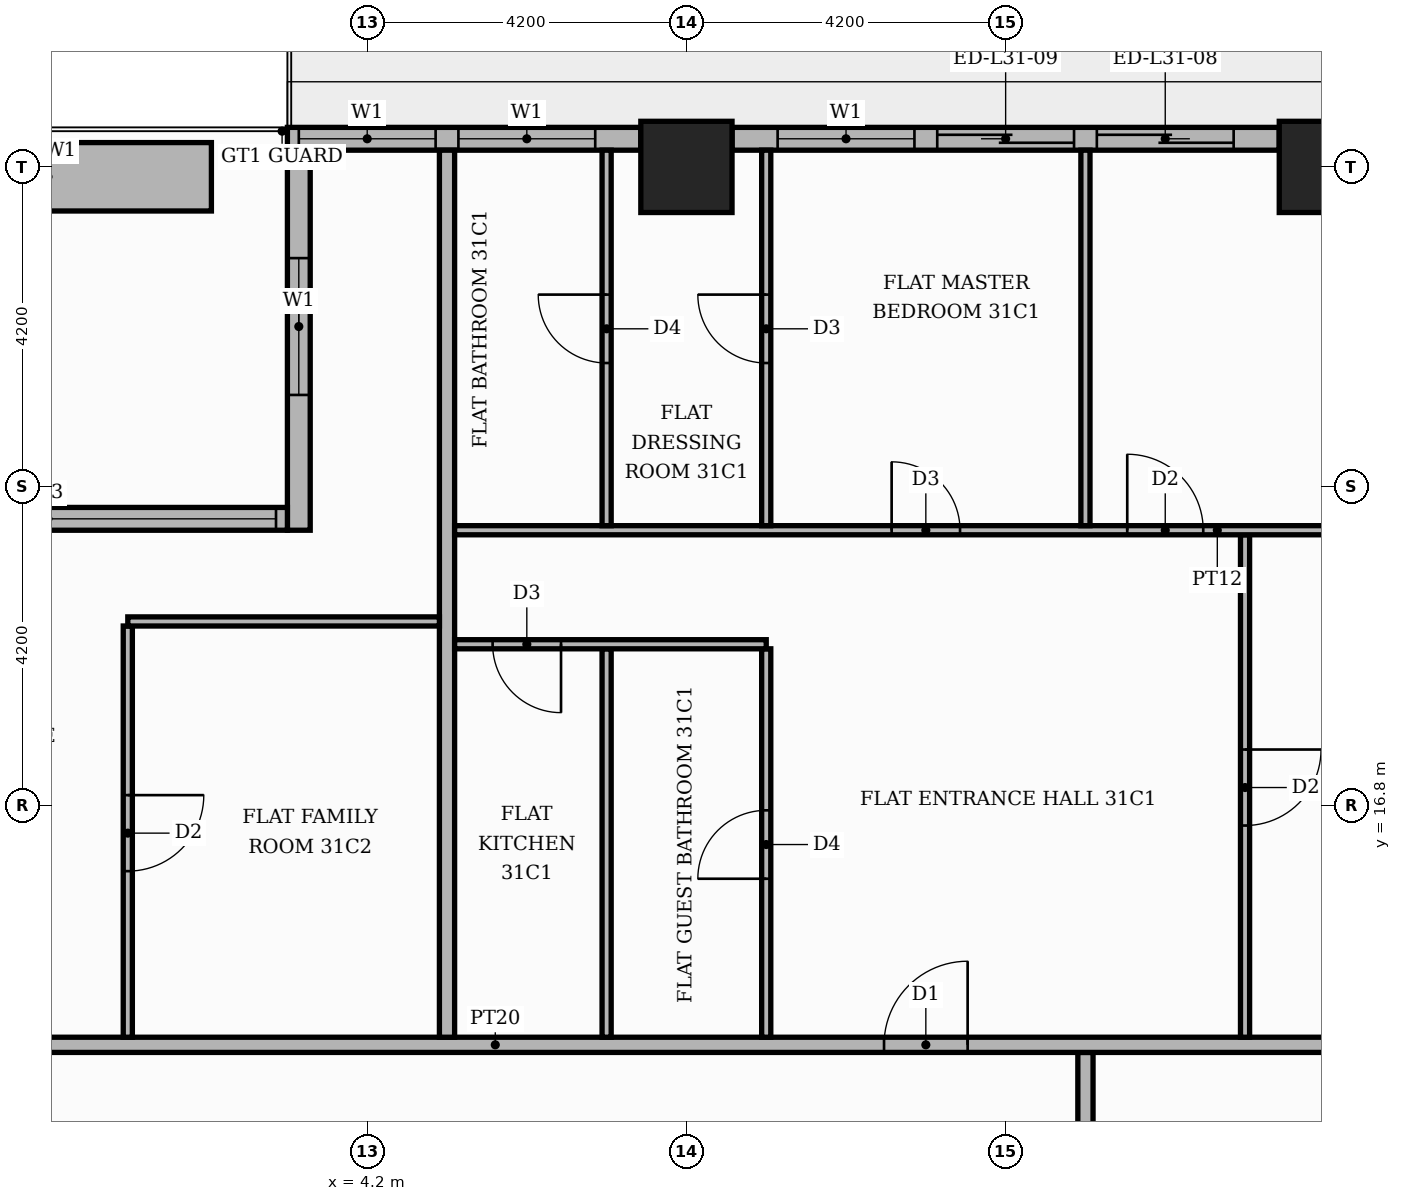
"""IFC4 building model, lengths in metres.
Left out: names, types, materials, properties, quantities, classifications, styles, units other than length and angle.
Written with IfcOpenShell. Run it as: python <this file> out.ifc"""

import sys

from ifc_helpers import new_model, si_unit, direction, frame, frame_2d, origin, origin_2d, place, context, subcontext, project, spatial, rectangle, extrude, element, fill, save


model = new_model("IFC4")
c1 = context("Model", 3, precision=1e-05, world=origin(), true_north=direction((0.0, 1.0)))
c2 = subcontext(c1, "Body", "Model", "MODEL_VIEW")
j1 = project(units=[si_unit("LENGTHUNIT", "METRE"), si_unit("PLANEANGLEUNIT", "RADIAN")], contexts=[c1])
p1 = place(None, origin())
s1 = spatial("IfcSite", under=j1, at=p1, CompositionType="ELEMENT")
p2 = place(p1, origin())
s2 = spatial("IfcBuilding", under=s1, at=p2, CompositionType="ELEMENT")
p3 = place(p2, frame((0.0, 0.0, 133.8)))
s3 = spatial("IfcBuildingStorey", under=s2, at=p3, CompositionType="ELEMENT", Elevation=133.8)
for number, where, z_axis, x_axis in (
    (1, (8.4, 25.2, 0.0), (0.0, 0.0, 1.0), (1.0, 0.0, 0.0)),
    (2, (16.8, 25.2, 0.0), (0.0, 0.0, 1.0), (1.0, 0.0, 0.0)),
):
    element("IfcColumn", number, at=place(p3, frame(where, z_axis=z_axis, x_axis=x_axis)), inside=s3, PredefinedType="COLUMN", context=c2, shape_type="SweptSolid", body=[
        extrude(rectangle(XDim=1.2, YDim=1.2, at=origin_2d()), origin(), (0.0, 0.0, 1.0), 3.9),
    ])
p4 = place(p3, frame((16.2, 25.57, 0.0), z_axis=(0.0, 0.0, 1.0), x_axis=(-1.0, 0.0, 0.0)))
e3 = element("IfcWall", 3, at=p4, inside=s3, PredefinedType="STANDARD", context=c2, shape_type="SweptSolid", body=[
    extrude(rectangle(XDim=7.2, YDim=0.3, at=frame_2d((3.6, 0.0))), origin(), (0.0, 0.0, 1.0), 3.48),
])
p5 = place(p4, frame((0.6, 0.0, 0.0)))
e4 = element("IfcOpeningElement", 4, at=p5, cuts=e3, PredefinedType="OPENING", context=c2, shape_type="SweptSolid", body=[
    extrude(rectangle(XDim=1.8, YDim=2.4, at=frame_2d((0.9, 1.2))), frame((0.0, 0.16, 0.0), z_axis=(0.0, -1.0, 0.0), x_axis=(1.0, 0.0, 0.0)), (0.0, 0.0, 1.0), 0.32),
])
p6 = place(p4, frame((2.7, 0.0, 0.0)))
e5 = element("IfcOpeningElement", 5, at=p6, cuts=e3, PredefinedType="OPENING", context=c2, shape_type="SweptSolid", body=[
    extrude(rectangle(XDim=1.8, YDim=2.4, at=frame_2d((0.9, 1.2))), frame((0.0, 0.16, 0.0), z_axis=(0.0, -1.0, 0.0), x_axis=(1.0, 0.0, 0.0)), (0.0, 0.0, 1.0), 0.32),
])
p7 = place(p4, frame((4.8, 0.0, 0.9)))
e6 = element("IfcOpeningElement", 6, at=p7, cuts=e3, PredefinedType="OPENING", context=c2, shape_type="SweptSolid", body=[
    extrude(rectangle(XDim=1.8, YDim=2.1, at=frame_2d((0.9, 1.05))), frame((0.0, 0.16, 0.0), z_axis=(0.0, -1.0, 0.0), x_axis=(1.0, 0.0, 0.0)), (0.0, 0.0, 1.0), 0.32),
])
p8 = place(p3, frame((7.8, 25.57, 0.0), z_axis=(0.0, 0.0, 1.0), x_axis=(-1.0, 0.0, 0.0)))
e7 = element("IfcWall", 7, at=p8, inside=s3, PredefinedType="STANDARD", context=c2, shape_type="SweptSolid", body=[
    extrude(rectangle(XDim=4.65, YDim=0.3, at=frame_2d((2.325, 0.0))), origin(), (0.0, 0.0, 1.0), 3.48),
])
p9 = place(p8, frame((0.6, 0.0, 0.9)))
e8 = element("IfcOpeningElement", 8, at=p9, cuts=e7, PredefinedType="OPENING", context=c2, shape_type="SweptSolid", body=[
    extrude(rectangle(XDim=1.8, YDim=2.1, at=frame_2d((0.9, 1.05))), frame((0.0, 0.16, 0.0), z_axis=(0.0, -1.0, 0.0), x_axis=(1.0, 0.0, 0.0)), (0.0, 0.0, 1.0), 0.32),
])
p10 = place(p8, frame((2.7, 0.0, 0.9)))
e9 = element("IfcOpeningElement", 9, at=p10, cuts=e7, PredefinedType="OPENING", context=c2, shape_type="SweptSolid", body=[
    extrude(rectangle(XDim=1.8, YDim=2.1, at=frame_2d((0.9, 1.05))), frame((0.0, 0.16, 0.0), z_axis=(0.0, -1.0, 0.0), x_axis=(1.0, 0.0, 0.0)), (0.0, 0.0, 1.0), 0.32),
])
p11 = place(p3, frame((3.3, 25.42, 0.0), z_axis=(0.0, 0.0, 1.0), x_axis=(0.0, -1.0, 0.0)))
e10 = element("IfcWall", 10, at=p11, inside=s3, PredefinedType="STANDARD", context=c2, shape_type="SweptSolid", body=[
    extrude(rectangle(XDim=5.0, YDim=0.3, at=frame_2d((2.5, 0.0))), origin(), (0.0, 0.0, 1.0), 3.48),
])
p12 = place(p11, frame((1.42, 0.0, 0.9)))
e11 = element("IfcOpeningElement", 11, at=p12, cuts=e10, PredefinedType="OPENING", context=c2, shape_type="SweptSolid", body=[
    extrude(rectangle(XDim=1.8, YDim=2.1, at=frame_2d((0.9, 1.05))), frame((0.0, 0.16, 0.0), z_axis=(0.0, -1.0, 0.0), x_axis=(1.0, 0.0, 0.0)), (0.0, 0.0, 1.0), 0.32),
])
p13 = place(p3, frame((3.15, 20.57, 0.0), z_axis=(0.0, 0.0, 1.0), x_axis=(-1.0, 0.0, 0.0)))
e12 = element("IfcWall", 12, at=p13, inside=s3, PredefinedType="STANDARD", context=c2, shape_type="SweptSolid", body=[
    extrude(rectangle(XDim=6.6, YDim=0.3, at=frame_2d((3.3, 0.0))), origin(), (0.0, 0.0, 1.0), 3.48),
])
p14 = place(p13, frame((0.15, 0.0, 0.9)))
e13 = element("IfcOpeningElement", 13, at=p14, cuts=e12, PredefinedType="OPENING", context=c2, shape_type="SweptSolid", body=[
    extrude(rectangle(XDim=6.0, YDim=2.1, at=frame_2d((3.0, 1.05))), frame((0.0, 0.16, 0.0), z_axis=(0.0, -1.0, 0.0), x_axis=(1.0, 0.0, 0.0)), (0.0, 0.0, 1.0), 0.32),
])
p15 = place(p3, frame((-2.15, 25.07, 0.0), z_axis=(0.0, 0.0, 1.0), x_axis=(1.0, 0.0, 0.0)))
e14 = element("IfcWall", 14, at=p15, inside=s3, PredefinedType="MOVABLE", context=c2, shape_type="SweptSolid", body=[
    extrude(rectangle(XDim=4.3, YDim=0.9, at=frame_2d((2.15, 0.0))), origin(), (0.0, 0.0, 1.0), 0.6),
])
p16 = place(p3, frame((13.65, 11.1, 0.0), z_axis=(0.0, 0.0, 1.0), x_axis=(0.0, 1.0, 0.0)))
e15 = element("IfcWall", 15, at=p16, inside=s3, PredefinedType="PARTITIONING", context=c2, shape_type="SweptSolid", body=[
    extrude(rectangle(XDim=2.45, YDim=0.2, at=frame_2d((1.225, 0.0))), origin(), (0.0, 0.0, 1.0), 3.48),
])
p17 = place(p3, frame((-13.65, 13.65, 0.0), z_axis=(0.0, 0.0, 1.0), x_axis=(1.0, 0.0, 0.0)))
e16 = element("IfcWall", 16, at=p17, inside=s3, PredefinedType="PARTITIONING", context=c2, shape_type="SweptSolid", body=[
    extrude(rectangle(XDim=39.07, YDim=0.2, at=frame_2d((19.535, 0.0))), origin(), (0.0, 0.0, 1.0), 3.48),
])
p18 = place(p17, frame((24.65, 0.0, 0.0)))
e17 = element("IfcOpeningElement", 17, at=p18, cuts=e16, PredefinedType="OPENING", context=c2, shape_type="SweptSolid", body=[
    extrude(rectangle(XDim=1.1, YDim=2.4, at=frame_2d((0.55, 1.2))), frame((0.0, 0.11, 0.0), z_axis=(0.0, -1.0, 0.0), x_axis=(1.0, 0.0, 0.0)), (0.0, 0.0, 1.0), 0.22),
])
p19 = place(p17, frame((12.05, 0.0, 0.0)))
e18 = element("IfcOpeningElement", 18, at=p19, cuts=e16, PredefinedType="OPENING", context=c2, shape_type="SweptSolid", body=[
    extrude(rectangle(XDim=1.1, YDim=2.4, at=frame_2d((0.55, 1.2))), frame((0.0, 0.11, 0.0), z_axis=(0.0, -1.0, 0.0), x_axis=(1.0, 0.0, 0.0)), (0.0, 0.0, 1.0), 0.22),
])
p20 = place(p3, frame((1.05, 13.75, 0.0), z_axis=(0.0, 0.0, 1.0), x_axis=(0.0, 1.0, 0.0)))
e19 = element("IfcWall", 19, at=p20, inside=s3, PredefinedType="PARTITIONING", context=c2, shape_type="SweptSolid", body=[
    extrude(rectangle(XDim=5.41, YDim=0.12, at=frame_2d((2.705, 0.0))), origin(), (0.0, 0.0, 1.0), 3.48),
])
p21 = place(p20, frame((2.185, 0.0, 0.0)))
e20 = element("IfcOpeningElement", 20, at=p21, cuts=e19, PredefinedType="OPENING", context=c2, shape_type="SweptSolid", body=[
    extrude(rectangle(XDim=1.0, YDim=2.1, at=frame_2d((0.5, 1.05))), frame((0.0, 0.07, 0.0), z_axis=(0.0, -1.0, 0.0), x_axis=(1.0, 0.0, 0.0)), (0.0, 0.0, 1.0), 0.14),
])
p22 = place(p3, frame((5.25, 13.75, 0.0), z_axis=(0.0, 0.0, 1.0), x_axis=(0.0, 1.0, 0.0)))
e21 = element("IfcWall", 21, at=p22, inside=s3, PredefinedType="PARTITIONING", context=c2, shape_type="SweptSolid", body=[
    extrude(rectangle(XDim=11.67, YDim=0.2, at=frame_2d((5.835, 0.0))), origin(), (0.0, 0.0, 1.0), 3.48),
])
p23 = place(p3, frame((7.35, 13.75, 0.0), z_axis=(0.0, 0.0, 1.0), x_axis=(0.0, 1.0, 0.0)))
e22 = element("IfcWall", 22, at=p23, inside=s3, PredefinedType="PARTITIONING", context=c2, shape_type="SweptSolid", body=[
    extrude(rectangle(XDim=5.11, YDim=0.12, at=frame_2d((2.555, 0.0))), origin(), (0.0, 0.0, 1.0), 3.48),
])
p24 = place(p3, frame((9.45, 13.75, 0.0), z_axis=(0.0, 0.0, 1.0), x_axis=(0.0, 1.0, 0.0)))
e23 = element("IfcWall", 23, at=p24, inside=s3, PredefinedType="PARTITIONING", context=c2, shape_type="SweptSolid", body=[
    extrude(rectangle(XDim=5.11, YDim=0.12, at=frame_2d((2.555, 0.0))), origin(), (0.0, 0.0, 1.0), 3.48),
])
p25 = place(p24, frame((2.085, 0.0, 0.0)))
e24 = element("IfcOpeningElement", 24, at=p25, cuts=e23, PredefinedType="OPENING", context=c2, shape_type="SweptSolid", body=[
    extrude(rectangle(XDim=0.9, YDim=2.1, at=frame_2d((0.45, 1.05))), frame((0.0, 0.07, 0.0), z_axis=(0.0, -1.0, 0.0), x_axis=(1.0, 0.0, 0.0)), (0.0, 0.0, 1.0), 0.14),
])
p26 = place(p3, frame((15.75, 13.75, 0.0), z_axis=(0.0, 0.0, 1.0), x_axis=(0.0, 1.0, 0.0)))
e25 = element("IfcWall", 25, at=p26, inside=s3, PredefinedType="PARTITIONING", context=c2, shape_type="SweptSolid", body=[
    extrude(rectangle(XDim=6.61, YDim=0.12, at=frame_2d((3.305, 0.0))), origin(), (0.0, 0.0, 1.0), 3.48),
])
p27 = place(p26, frame((2.785, 0.0, 0.0)))
e26 = element("IfcOpeningElement", 26, at=p27, cuts=e25, PredefinedType="OPENING", context=c2, shape_type="SweptSolid", body=[
    extrude(rectangle(XDim=1.0, YDim=2.1, at=frame_2d((0.5, 1.05))), frame((0.0, 0.07, 0.0), z_axis=(0.0, -1.0, 0.0), x_axis=(1.0, 0.0, 0.0)), (0.0, 0.0, 1.0), 0.14),
])
p28 = place(p3, frame((5.35, 18.92, 0.0), z_axis=(0.0, 0.0, 1.0), x_axis=(1.0, 0.0, 0.0)))
e27 = element("IfcWall", 27, at=p28, inside=s3, PredefinedType="PARTITIONING", context=c2, shape_type="SweptSolid", body=[
    extrude(rectangle(XDim=4.1, YDim=0.12, at=frame_2d((2.05, 0.0))), origin(), (0.0, 0.0, 1.0), 3.48),
])
p29 = place(p28, frame((0.5, 0.0, 0.0)))
e28 = element("IfcOpeningElement", 28, at=p29, cuts=e27, PredefinedType="OPENING", context=c2, shape_type="SweptSolid", body=[
    extrude(rectangle(XDim=0.9, YDim=2.1, at=frame_2d((0.45, 1.05))), frame((0.0, 0.07, 0.0), z_axis=(0.0, -1.0, 0.0), x_axis=(1.0, 0.0, 0.0)), (0.0, 0.0, 1.0), 0.14),
])
p30 = place(p3, frame((1.05, 19.22, 0.0), z_axis=(0.0, 0.0, 1.0), x_axis=(1.0, 0.0, 0.0)))
e29 = element("IfcWall", 29, at=p30, inside=s3, PredefinedType="PARTITIONING", context=c2, shape_type="SweptSolid", body=[
    extrude(rectangle(XDim=4.1, YDim=0.12, at=frame_2d((2.05, 0.0))), origin(), (0.0, 0.0, 1.0), 3.48),
])
p31 = place(p3, frame((5.35, 20.42, 0.0), z_axis=(0.0, 0.0, 1.0), x_axis=(1.0, 0.0, 0.0)))
e30 = element("IfcWall", 30, at=p31, inside=s3, PredefinedType="PARTITIONING", context=c2, shape_type="SweptSolid", body=[
    extrude(rectangle(XDim=20.07, YDim=0.12, at=frame_2d((10.035, 0.0))), origin(), (0.0, 0.0, 1.0), 3.48),
])
p32 = place(p31, frame((8.85, 0.0, 0.0)))
e31 = element("IfcOpeningElement", 31, at=p32, cuts=e30, PredefinedType="OPENING", context=c2, shape_type="SweptSolid", body=[
    extrude(rectangle(XDim=1.0, YDim=2.1, at=frame_2d((0.5, 1.05))), frame((0.0, 0.07, 0.0), z_axis=(0.0, -1.0, 0.0), x_axis=(1.0, 0.0, 0.0)), (0.0, 0.0, 1.0), 0.14),
])
p33 = place(p31, frame((5.75, 0.0, 0.0)))
e32 = element("IfcOpeningElement", 32, at=p33, cuts=e30, PredefinedType="OPENING", context=c2, shape_type="SweptSolid", body=[
    extrude(rectangle(XDim=0.9, YDim=2.1, at=frame_2d((0.45, 1.05))), frame((0.0, 0.07, 0.0), z_axis=(0.0, -1.0, 0.0), x_axis=(1.0, 0.0, 0.0)), (0.0, 0.0, 1.0), 0.14),
])
p34 = place(p3, frame((7.35, 20.48, 0.0), z_axis=(0.0, 0.0, 1.0), x_axis=(0.0, 1.0, 0.0)))
e33 = element("IfcWall", 33, at=p34, inside=s3, PredefinedType="PARTITIONING", context=c2, shape_type="SweptSolid", body=[
    extrude(rectangle(XDim=4.94, YDim=0.12, at=frame_2d((2.47, 0.0))), origin(), (0.0, 0.0, 1.0), 3.48),
])
p35 = place(p34, frame((2.14, 0.0, 0.0)))
e34 = element("IfcOpeningElement", 34, at=p35, cuts=e33, PredefinedType="OPENING", context=c2, shape_type="SweptSolid", body=[
    extrude(rectangle(XDim=0.9, YDim=2.1, at=frame_2d((0.45, 1.05))), frame((0.0, 0.07, 0.0), z_axis=(0.0, -1.0, 0.0), x_axis=(1.0, 0.0, 0.0)), (0.0, 0.0, 1.0), 0.14),
])
p36 = place(p3, frame((9.45, 20.48, 0.0), z_axis=(0.0, 0.0, 1.0), x_axis=(0.0, 1.0, 0.0)))
e35 = element("IfcWall", 35, at=p36, inside=s3, PredefinedType="PARTITIONING", context=c2, shape_type="SweptSolid", body=[
    extrude(rectangle(XDim=4.94, YDim=0.12, at=frame_2d((2.47, 0.0))), origin(), (0.0, 0.0, 1.0), 3.48),
])
p37 = place(p36, frame((2.14, 0.0, 0.0)))
e36 = element("IfcOpeningElement", 36, at=p37, cuts=e35, PredefinedType="OPENING", context=c2, shape_type="SweptSolid", body=[
    extrude(rectangle(XDim=0.9, YDim=2.1, at=frame_2d((0.45, 1.05))), frame((0.0, 0.07, 0.0), z_axis=(0.0, -1.0, 0.0), x_axis=(1.0, 0.0, 0.0)), (0.0, 0.0, 1.0), 0.14),
])
p38 = place(p3, frame((13.65, 20.48, 0.0), z_axis=(0.0, 0.0, 1.0), x_axis=(0.0, 1.0, 0.0)))
e37 = element("IfcWall", 37, at=p38, inside=s3, PredefinedType="PARTITIONING", context=c2, shape_type="SweptSolid", body=[
    extrude(rectangle(XDim=4.94, YDim=0.12, at=frame_2d((2.47, 0.0))), origin(), (0.0, 0.0, 1.0), 3.48),
])
p39 = place(p5, origin())
e38 = element("IfcDoor", 38, at=p39, inside=s3, OperationType="SLIDING_TO_LEFT", PredefinedType="DOOR", context=c2, shape_type="SweptSolid", body=[
    extrude(rectangle(XDim=1.8, YDim=2.4, at=frame_2d((0.9, 1.2))), frame((0.0, 0.025, 0.0), z_axis=(0.0, -1.0, 0.0), x_axis=(1.0, 0.0, 0.0)), (0.0, 0.0, 1.0), 0.05),
])
fill(e4, e38)
p40 = place(p6, origin())
e39 = element("IfcDoor", 39, at=p40, inside=s3, OperationType="SLIDING_TO_RIGHT", PredefinedType="DOOR", context=c2, shape_type="SweptSolid", body=[
    extrude(rectangle(XDim=1.8, YDim=2.4, at=frame_2d((0.9, 1.2))), frame((0.0, 0.025, 0.0), z_axis=(0.0, -1.0, 0.0), x_axis=(1.0, 0.0, 0.0)), (0.0, 0.0, 1.0), 0.05),
])
fill(e5, e39)
p41 = place(p7, origin())
e40 = element("IfcWindow", 40, at=p41, inside=s3, PartitioningType="SINGLE_PANEL", PredefinedType="WINDOW", context=c2, shape_type="SweptSolid", body=[
    extrude(rectangle(XDim=1.8, YDim=2.1, at=frame_2d((0.9, 1.05))), frame((0.0, 0.03, 0.0), z_axis=(0.0, -1.0, 0.0), x_axis=(1.0, 0.0, 0.0)), (0.0, 0.0, 1.0), 0.06),
])
fill(e6, e40)
p42 = place(p9, origin())
e41 = element("IfcWindow", 41, at=p42, inside=s3, PartitioningType="SINGLE_PANEL", PredefinedType="WINDOW", context=c2, shape_type="SweptSolid", body=[
    extrude(rectangle(XDim=1.8, YDim=2.1, at=frame_2d((0.9, 1.05))), frame((0.0, 0.03, 0.0), z_axis=(0.0, -1.0, 0.0), x_axis=(1.0, 0.0, 0.0)), (0.0, 0.0, 1.0), 0.06),
])
fill(e8, e41)
p43 = place(p10, origin())
e42 = element("IfcWindow", 42, at=p43, inside=s3, PartitioningType="SINGLE_PANEL", PredefinedType="WINDOW", context=c2, shape_type="SweptSolid", body=[
    extrude(rectangle(XDim=1.8, YDim=2.1, at=frame_2d((0.9, 1.05))), frame((0.0, 0.03, 0.0), z_axis=(0.0, -1.0, 0.0), x_axis=(1.0, 0.0, 0.0)), (0.0, 0.0, 1.0), 0.06),
])
fill(e9, e42)
p44 = place(p12, origin())
e43 = element("IfcWindow", 43, at=p44, inside=s3, PartitioningType="SINGLE_PANEL", PredefinedType="WINDOW", context=c2, shape_type="SweptSolid", body=[
    extrude(rectangle(XDim=1.8, YDim=2.1, at=frame_2d((0.9, 1.05))), frame((0.0, 0.03, 0.0), z_axis=(0.0, -1.0, 0.0), x_axis=(1.0, 0.0, 0.0)), (0.0, 0.0, 1.0), 0.06),
])
fill(e11, e43)
p45 = place(p14, origin())
e44 = element("IfcWindow", 44, at=p45, inside=s3, PartitioningType="SINGLE_PANEL", PredefinedType="WINDOW", context=c2, shape_type="SweptSolid", body=[
    extrude(rectangle(XDim=6.0, YDim=2.1, at=frame_2d((3.0, 1.05))), frame((0.0, 0.03, 0.0), z_axis=(0.0, -1.0, 0.0), x_axis=(1.0, 0.0, 0.0)), (0.0, 0.0, 1.0), 0.06),
])
fill(e13, e44)
p46 = place(p18, origin())
e45 = element("IfcDoor", 45, at=p46, inside=s3, OperationType="SINGLE_SWING_RIGHT", PredefinedType="DOOR", context=c2, shape_type="SweptSolid", body=[
    extrude(rectangle(XDim=1.1, YDim=2.4, at=frame_2d((0.55, 1.2))), frame((0.0, 0.025, 0.0), z_axis=(0.0, -1.0, 0.0), x_axis=(1.0, 0.0, 0.0)), (0.0, 0.0, 1.0), 0.05),
])
fill(e17, e45)
p47 = place(p27, frame((1.0, 0.0, 0.0), z_axis=(0.0, 0.0, 1.0), x_axis=(-1.0, 0.0, 0.0)))
e46 = element("IfcDoor", 46, at=p47, inside=s3, OperationType="SINGLE_SWING_RIGHT", PredefinedType="DOOR", context=c2, shape_type="SweptSolid", body=[
    extrude(rectangle(XDim=1.0, YDim=2.1, at=frame_2d((0.5, 1.05))), frame((0.0, 0.025, 0.0), z_axis=(0.0, -1.0, 0.0), x_axis=(1.0, 0.0, 0.0)), (0.0, 0.0, 1.0), 0.05),
])
fill(e26, e46)
p48 = place(p25, origin())
e47 = element("IfcDoor", 47, at=p48, inside=s3, OperationType="SINGLE_SWING_LEFT", PredefinedType="DOOR", context=c2, shape_type="SweptSolid", body=[
    extrude(rectangle(XDim=0.9, YDim=2.1, at=frame_2d((0.45, 1.05))), frame((0.0, 0.025, 0.0), z_axis=(0.0, -1.0, 0.0), x_axis=(1.0, 0.0, 0.0)), (0.0, 0.0, 1.0), 0.05),
])
fill(e24, e47)
p49 = place(p29, frame((0.9, 0.0, 0.0), z_axis=(0.0, 0.0, 1.0), x_axis=(-1.0, 0.0, 0.0)))
e48 = element("IfcDoor", 48, at=p49, inside=s3, OperationType="SINGLE_SWING_RIGHT", PredefinedType="DOOR", context=c2, shape_type="SweptSolid", body=[
    extrude(rectangle(XDim=0.9, YDim=2.1, at=frame_2d((0.45, 1.05))), frame((0.0, 0.025, 0.0), z_axis=(0.0, -1.0, 0.0), x_axis=(1.0, 0.0, 0.0)), (0.0, 0.0, 1.0), 0.05),
])
fill(e28, e48)
p50 = place(p32, origin())
e49 = element("IfcDoor", 49, at=p50, inside=s3, OperationType="SINGLE_SWING_LEFT", PredefinedType="DOOR", context=c2, shape_type="SweptSolid", body=[
    extrude(rectangle(XDim=1.0, YDim=2.1, at=frame_2d((0.5, 1.05))), frame((0.0, 0.025, 0.0), z_axis=(0.0, -1.0, 0.0), x_axis=(1.0, 0.0, 0.0)), (0.0, 0.0, 1.0), 0.05),
])
fill(e31, e49)
p51 = place(p33, origin())
e50 = element("IfcDoor", 50, at=p51, inside=s3, OperationType="SINGLE_SWING_LEFT", PredefinedType="DOOR", context=c2, shape_type="SweptSolid", body=[
    extrude(rectangle(XDim=0.9, YDim=2.1, at=frame_2d((0.45, 1.05))), frame((0.0, 0.025, 0.0), z_axis=(0.0, -1.0, 0.0), x_axis=(1.0, 0.0, 0.0)), (0.0, 0.0, 1.0), 0.05),
])
fill(e32, e50)
p52 = place(p37, origin())
e51 = element("IfcDoor", 51, at=p52, inside=s3, OperationType="SINGLE_SWING_RIGHT", PredefinedType="DOOR", context=c2, shape_type="SweptSolid", body=[
    extrude(rectangle(XDim=0.9, YDim=2.1, at=frame_2d((0.45, 1.05))), frame((0.0, 0.025, 0.0), z_axis=(0.0, -1.0, 0.0), x_axis=(1.0, 0.0, 0.0)), (0.0, 0.0, 1.0), 0.05),
])
fill(e36, e51)
p53 = place(p35, origin())
e52 = element("IfcDoor", 52, at=p53, inside=s3, OperationType="SINGLE_SWING_RIGHT", PredefinedType="DOOR", context=c2, shape_type="SweptSolid", body=[
    extrude(rectangle(XDim=0.9, YDim=2.1, at=frame_2d((0.45, 1.05))), frame((0.0, 0.025, 0.0), z_axis=(0.0, -1.0, 0.0), x_axis=(1.0, 0.0, 0.0)), (0.0, 0.0, 1.0), 0.05),
])
fill(e34, e52)
p54 = place(p21, frame((1.0, 0.0, 0.0), z_axis=(0.0, 0.0, 1.0), x_axis=(-1.0, 0.0, 0.0)))
e53 = element("IfcDoor", 53, at=p54, inside=s3, OperationType="SINGLE_SWING_RIGHT", PredefinedType="DOOR", context=c2, shape_type="SweptSolid", body=[
    extrude(rectangle(XDim=1.0, YDim=2.1, at=frame_2d((0.5, 1.05))), frame((0.0, 0.025, 0.0), z_axis=(0.0, -1.0, 0.0), x_axis=(1.0, 0.0, 0.0)), (0.0, 0.0, 1.0), 0.05),
])
fill(e20, e53)
save(model, sys.argv[1])
